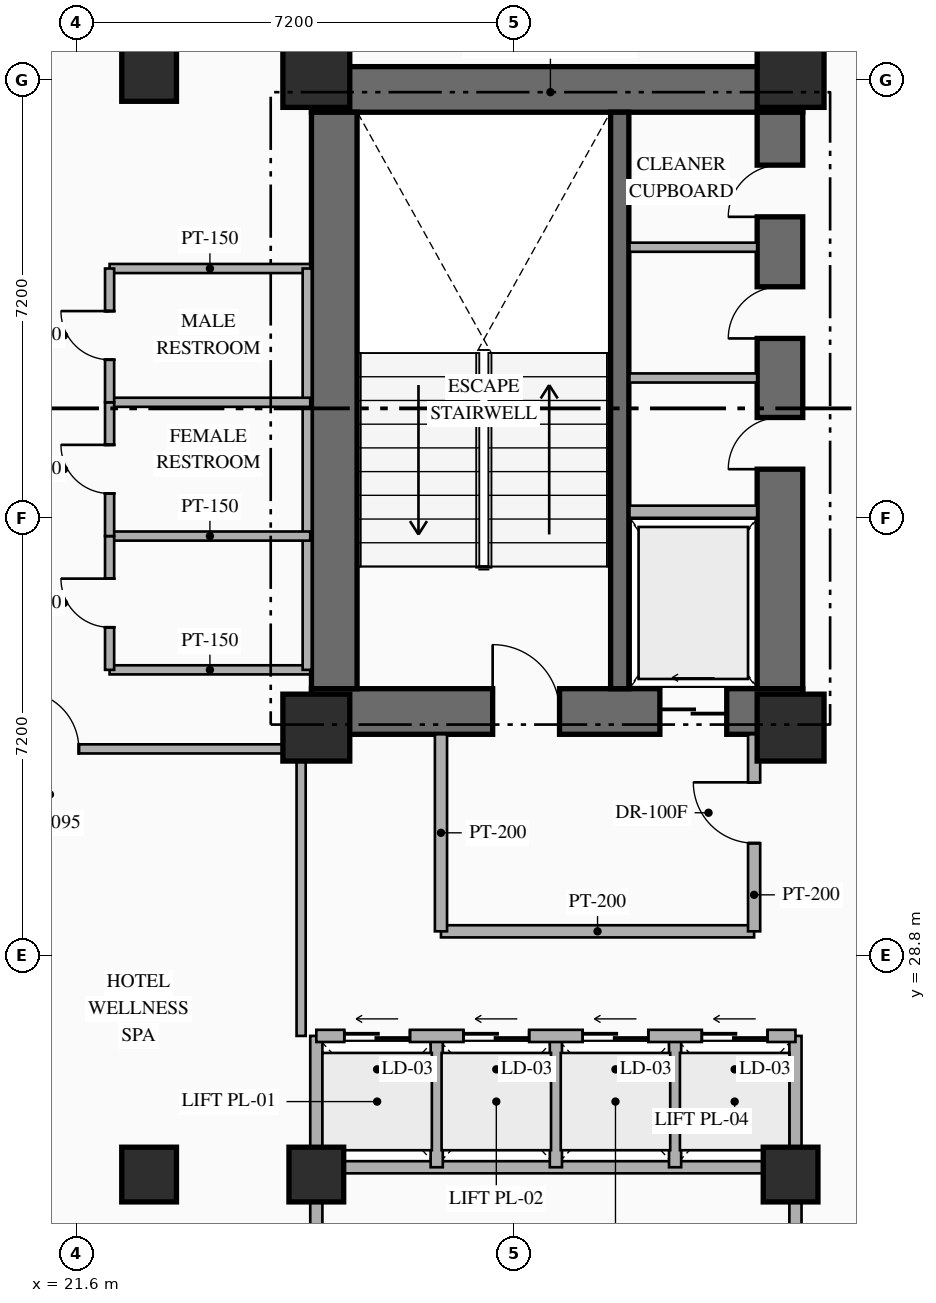
"""IFC4 building model, lengths in metres.
Left out: names, types, materials, properties, quantities, classifications, styles, units other than length and angle.
Written with IfcOpenShell. Run it as: python <this file> out.ifc"""

import sys

from ifc_helpers import new_model, si_unit, direction, frame, frame_2d, origin, origin_2d, place, context, subcontext, project, spatial, rectangle, hollow_rectangle, extrude, element, fill, save


model = new_model("IFC4")
c1 = context("Model", 3, precision=1e-05, world=origin(), true_north=direction((0.0, 1.0)))
c2 = subcontext(c1, "Body", "Model", "MODEL_VIEW")
j1 = project(units=[si_unit("LENGTHUNIT", "METRE"), si_unit("PLANEANGLEUNIT", "RADIAN")], contexts=[c1])
p1 = place(None, origin())
s1 = spatial("IfcSite", under=j1, at=p1, CompositionType="ELEMENT")
p2 = place(p1, origin())
s2 = spatial("IfcBuilding", under=s1, at=p2, CompositionType="ELEMENT")
p3 = place(p2, frame((0.0, 0.0, 81.3)))
s3 = spatial("IfcBuildingStorey", under=s2, at=p3, CompositionType="ELEMENT", Elevation=81.3)
p4 = place(p3, frame((25.47, 32.815, 0.0), z_axis=(0.0, 0.0, 1.0), x_axis=(1.0, 0.0, 0.0)))
e1 = element("IfcWall", 1, at=p4, inside=s3, PredefinedType="SHEAR", context=c2, shape_type="SweptSolid", body=[
    extrude(rectangle(XDim=8.08, YDim=0.75, at=frame_2d((4.04, 0.0))), origin(), (0.0, 0.0, 1.0), 3.35),
])
p5 = place(p4, frame((2.98, 0.0, 0.0)))
e2 = element("IfcOpeningElement", 2, at=p5, cuts=e1, PredefinedType="OPENING", context=c2, shape_type="SweptSolid", body=[
    extrude(rectangle(XDim=1.1, YDim=2.2, at=frame_2d((0.55, 1.1))), frame((0.0, 0.385, 0.0), z_axis=(0.0, -1.0, 0.0), x_axis=(1.0, 0.0, 0.0)), (0.0, 0.0, 1.0), 0.77),
])
p6 = place(p4, frame((5.73, 0.0, 0.0)))
e3 = element("IfcOpeningElement", 3, at=p6, cuts=e1, PredefinedType="OPENING", context=c2, shape_type="SweptSolid", body=[
    extrude(rectangle(XDim=1.1, YDim=2.15, at=frame_2d((0.55, 1.075))), frame((0.0, 0.385, 0.0), z_axis=(0.0, -1.0, 0.0), x_axis=(1.0, 0.0, 0.0)), (0.0, 0.0, 1.0), 0.77),
])
p7 = place(p3, frame((25.47, 43.045, 0.0), z_axis=(0.0, 0.0, 1.0), x_axis=(1.0, 0.0, 0.0)))
e4 = element("IfcWall", 4, at=p7, inside=s3, PredefinedType="SHEAR", context=c2, shape_type="SweptSolid", body=[
    extrude(rectangle(XDim=8.08, YDim=0.75, at=frame_2d((4.04, 0.0))), origin(), (0.0, 0.0, 1.0), 3.35),
])
p8 = place(p3, frame((25.845, 33.19, 0.0), z_axis=(0.0, 0.0, 1.0), x_axis=(0.0, 1.0, 0.0)))
e5 = element("IfcWall", 5, at=p8, inside=s3, PredefinedType="SHEAR", context=c2, shape_type="SweptSolid", body=[
    extrude(rectangle(XDim=9.48, YDim=0.75, at=frame_2d((4.74, 0.0))), origin(), (0.0, 0.0, 1.0), 3.35),
])
p9 = place(p3, frame((33.175, 33.19, 0.0), z_axis=(0.0, 0.0, 1.0), x_axis=(0.0, 1.0, 0.0)))
e6 = element("IfcWall", 6, at=p9, inside=s3, PredefinedType="SHEAR", context=c2, shape_type="SweptSolid", body=[
    extrude(rectangle(XDim=9.48, YDim=0.75, at=frame_2d((4.74, 0.0))), origin(), (0.0, 0.0, 1.0), 3.35),
])
p10 = place(p9, frame((3.61, 0.0, 0.0)))
e7 = element("IfcOpeningElement", 7, at=p10, cuts=e6, PredefinedType="OPENING", context=c2, shape_type="SweptSolid", body=[
    extrude(rectangle(XDim=0.85, YDim=2.08, at=frame_2d((0.425, 1.04))), frame((0.0, 0.385, 0.0), z_axis=(0.0, -1.0, 0.0), x_axis=(1.0, 0.0, 0.0)), (0.0, 0.0, 1.0), 0.77),
])
p11 = place(p9, frame((5.76, 0.0, 0.0)))
e8 = element("IfcOpeningElement", 8, at=p11, cuts=e6, PredefinedType="OPENING", context=c2, shape_type="SweptSolid", body=[
    extrude(rectangle(XDim=0.85, YDim=2.08, at=frame_2d((0.425, 1.04))), frame((0.0, 0.385, 0.0), z_axis=(0.0, -1.0, 0.0), x_axis=(1.0, 0.0, 0.0)), (0.0, 0.0, 1.0), 0.77),
])
p12 = place(p9, frame((7.76, 0.0, 0.0)))
e9 = element("IfcOpeningElement", 9, at=p12, cuts=e6, PredefinedType="OPENING", context=c2, shape_type="SweptSolid", body=[
    extrude(rectangle(XDim=0.85, YDim=2.08, at=frame_2d((0.425, 1.04))), frame((0.0, 0.385, 0.0), z_axis=(0.0, -1.0, 0.0), x_axis=(1.0, 0.0, 0.0)), (0.0, 0.0, 1.0), 0.77),
])
p13 = place(p3, frame((30.54, 33.19, 0.0), z_axis=(0.0, 0.0, 1.0), x_axis=(0.0, 1.0, 0.0)))
e10 = element("IfcWall", 10, at=p13, inside=s3, PredefinedType="SHEAR", context=c2, shape_type="SweptSolid", body=[
    extrude(rectangle(XDim=9.48, YDim=0.3, at=frame_2d((4.74, 0.0))), origin(), (0.0, 0.0, 1.0), 3.35),
])
for number, where, z_axis, x_axis in (
    (11, (25.55, 32.55, 0.0), (0.0, 0.0, 1.0), (1.0, 0.0, 0.0)),
    (12, (33.35, 32.55, 0.0), (0.0, 0.0, 1.0), (1.0, 0.0, 0.0)),
    (13, (25.55, 43.3, 0.0), (0.0, 0.0, 1.0), (1.0, 0.0, 0.0)),
    (14, (33.35, 43.3, 0.0), (0.0, 0.0, 1.0), (1.0, 0.0, 0.0)),
):
    element("IfcColumn", number, at=place(p3, frame(where, z_axis=z_axis, x_axis=x_axis)), inside=s3, PredefinedType="COLUMN", context=c2, shape_type="SweptSolid", body=[
        extrude(rectangle(XDim=1.1, YDim=1.1, at=origin_2d()), origin(), (0.0, 0.0, 1.0), 3.35),
    ])
for number, where, z_axis, x_axis in (
    (15, (25.55, 25.2, 0.0), (0.0, 0.0, 1.0), (1.0, 0.0, 0.0)),
    (16, (33.35, 25.2, 0.0), (0.0, 0.0, 1.0), (1.0, 0.0, 0.0)),
    (17, (22.8, 25.2, 0.0), (0.0, 0.0, 1.0), (1.0, 0.0, 0.0)),
    (18, (22.8, 43.3, 0.0), (0.0, 0.0, 1.0), (1.0, 0.0, 0.0)),
):
    element("IfcColumn", number, at=place(p3, frame(where, z_axis=z_axis, x_axis=x_axis)), inside=s3, PredefinedType="COLUMN", context=c2, shape_type="SweptSolid", body=[
        extrude(hollow_rectangle(XDim=0.9, YDim=0.9, WallThickness=0.036, at=origin_2d()), origin(), (0.0, 0.0, 1.0), 3.35),
    ])
p14 = place(p3, frame((30.7, 36.1, 0.0), z_axis=(0.0, 0.0, 1.0), x_axis=(1.0, 0.0, 0.0)))
e19 = element("IfcWall", 19, at=p14, inside=s3, PredefinedType="STANDARD", context=c2, shape_type="SweptSolid", body=[
    extrude(rectangle(XDim=2.1, YDim=0.2, at=frame_2d((1.05, 0.0))), origin(), (0.0, 0.0, 1.0), 3.13),
])
for number, where, z_axis, x_axis in (
    (20, (30.7, 38.3, 0.0), (0.0, 0.0, 1.0), (1.0, 0.0, 0.0)),
    (21, (30.7, 40.45, 0.0), (0.0, 0.0, 1.0), (1.0, 0.0, 0.0)),
):
    element("IfcWall", number, at=place(p3, frame(where, z_axis=z_axis, x_axis=x_axis)), inside=s3, PredefinedType="PARTITIONING", context=c2, shape_type="SweptSolid", body=[
        extrude(rectangle(XDim=2.1, YDim=0.15, at=frame_2d((1.05, 0.0))), origin(), (0.0, 0.0, 1.0), 3.13),
    ])
p15 = place(p3, frame((27.6, 29.2, 0.0), z_axis=(0.0, 0.0, 1.0), x_axis=(1.0, 0.0, 0.0)))
e22 = element("IfcWall", 22, at=p15, inside=s3, PredefinedType="STANDARD", context=c2, shape_type="SweptSolid", body=[
    extrude(rectangle(XDim=5.15, YDim=0.2, at=frame_2d((2.575, 0.0))), origin(), (0.0, 0.0, 1.0), 3.13),
])
p16 = place(p3, frame((27.6, 29.2, 0.0), z_axis=(0.0, 0.0, 1.0), x_axis=(0.0, 1.0, 0.0)))
e23 = element("IfcWall", 23, at=p16, inside=s3, PredefinedType="STANDARD", context=c2, shape_type="SweptSolid", body=[
    extrude(rectangle(XDim=3.24, YDim=0.2, at=frame_2d((1.62, 0.0))), origin(), (0.0, 0.0, 1.0), 3.13),
])
p17 = place(p3, frame((32.75, 29.2, 0.0), z_axis=(0.0, 0.0, 1.0), x_axis=(0.0, 1.0, 0.0)))
e24 = element("IfcWall", 24, at=p17, inside=s3, PredefinedType="STANDARD", context=c2, shape_type="SweptSolid", body=[
    extrude(rectangle(XDim=3.24, YDim=0.2, at=frame_2d((1.62, 0.0))), origin(), (0.0, 0.0, 1.0), 3.13),
])
p18 = place(p17, frame((1.45, 0.0, 0.0)))
e25 = element("IfcOpeningElement", 25, at=p18, cuts=e24, PredefinedType="OPENING", context=c2, shape_type="SweptSolid", body=[
    extrude(rectangle(XDim=1.0, YDim=2.2, at=frame_2d((0.5, 1.1))), frame((0.0, 0.11, 0.0), z_axis=(0.0, -1.0, 0.0), x_axis=(1.0, 0.0, 0.0)), (0.0, 0.0, 1.0), 0.22),
])
for number, where, z_axis, x_axis in (
    (26, (25.55, 23.4, 0.0), (0.0, 0.0, 1.0), (0.0, 1.0, 0.0)),
    (27, (33.43, 23.4, 0.0), (0.0, 0.0, 1.0), (0.0, 1.0, 0.0)),
):
    element("IfcWall", number, at=place(p3, frame(where, z_axis=z_axis, x_axis=x_axis)), inside=s3, PredefinedType="STANDARD", context=c2, shape_type="SweptSolid", body=[
        extrude(rectangle(XDim=4.08, YDim=0.2, at=frame_2d((2.04, 0.0))), origin(), (0.0, 0.0, 1.0), 2.425),
    ])
p19 = place(p3, frame((25.55, 25.32, 0.0), z_axis=(0.0, 0.0, 1.0), x_axis=(1.0, 0.0, 0.0)))
e28 = element("IfcWall", 28, at=p19, inside=s3, PredefinedType="STANDARD", context=c2, shape_type="SweptSolid", body=[
    extrude(rectangle(XDim=7.88, YDim=0.2, at=frame_2d((3.94, 0.0))), origin(), (0.0, 0.0, 1.0), 2.525),
])
for number, where, z_axis, x_axis in (
    (29, (27.53, 25.32, 0.0), (0.0, 0.0, 1.0), (0.0, 1.0, 0.0)),
    (30, (29.49, 25.32, 0.0), (0.0, 0.0, 1.0), (0.0, 1.0, 0.0)),
    (31, (31.45, 25.32, 0.0), (0.0, 0.0, 1.0), (0.0, 1.0, 0.0)),
):
    element("IfcWall", number, at=place(p3, frame(where, z_axis=z_axis, x_axis=x_axis)), inside=s3, PredefinedType="STANDARD", context=c2, shape_type="SweptSolid", body=[
        extrude(rectangle(XDim=2.16, YDim=0.2, at=frame_2d((1.08, 0.0))), origin(), (0.0, 0.0, 1.0), 3.13),
    ])
p20 = place(p3, frame((25.55, 27.48, 0.0), z_axis=(0.0, 0.0, 1.0), x_axis=(1.0, 0.0, 0.0)))
e32 = element("IfcWall", 32, at=p20, inside=s3, PredefinedType="STANDARD", context=c2, shape_type="SweptSolid", body=[
    extrude(rectangle(XDim=7.88, YDim=0.2, at=frame_2d((3.94, 0.0))), origin(), (0.0, 0.0, 1.0), 3.13),
])
p21 = place(p20, frame((0.46, 0.0, 0.0)))
e33 = element("IfcOpeningElement", 33, at=p21, cuts=e32, PredefinedType="OPENING", context=c2, shape_type="SweptSolid", body=[
    extrude(rectangle(XDim=1.08, YDim=2.15, at=frame_2d((0.54, 1.075))), frame((0.0, 0.11, 0.0), z_axis=(0.0, -1.0, 0.0), x_axis=(1.0, 0.0, 0.0)), (0.0, 0.0, 1.0), 0.22),
])
p22 = place(p20, frame((2.42, 0.0, 0.0)))
e34 = element("IfcOpeningElement", 34, at=p22, cuts=e32, PredefinedType="OPENING", context=c2, shape_type="SweptSolid", body=[
    extrude(rectangle(XDim=1.08, YDim=2.15, at=frame_2d((0.54, 1.075))), frame((0.0, 0.11, 0.0), z_axis=(0.0, -1.0, 0.0), x_axis=(1.0, 0.0, 0.0)), (0.0, 0.0, 1.0), 0.22),
])
p23 = place(p20, frame((4.38, 0.0, 0.0)))
e35 = element("IfcOpeningElement", 35, at=p23, cuts=e32, PredefinedType="OPENING", context=c2, shape_type="SweptSolid", body=[
    extrude(rectangle(XDim=1.08, YDim=2.15, at=frame_2d((0.54, 1.075))), frame((0.0, 0.11, 0.0), z_axis=(0.0, -1.0, 0.0), x_axis=(1.0, 0.0, 0.0)), (0.0, 0.0, 1.0), 0.22),
])
p24 = place(p20, frame((6.34, 0.0, 0.0)))
e36 = element("IfcOpeningElement", 36, at=p24, cuts=e32, PredefinedType="OPENING", context=c2, shape_type="SweptSolid", body=[
    extrude(rectangle(XDim=1.08, YDim=2.15, at=frame_2d((0.54, 1.075))), frame((0.0, 0.11, 0.0), z_axis=(0.0, -1.0, 0.0), x_axis=(1.0, 0.0, 0.0)), (0.0, 0.0, 1.0), 0.22),
])
for number, where, z_axis, x_axis in (
    (37, (22.15, 33.5, 0.0), (0.0, 0.0, 1.0), (1.0, 0.0, 0.0)),
    (38, (22.15, 40.1, 0.0), (0.0, 0.0, 1.0), (1.0, 0.0, 0.0)),
):
    element("IfcWall", number, at=place(p3, frame(where, z_axis=z_axis, x_axis=x_axis)), inside=s3, PredefinedType="PARTITIONING", context=c2, shape_type="SweptSolid", body=[
        extrude(rectangle(XDim=3.3, YDim=0.15, at=frame_2d((1.65, 0.0))), origin(), (0.0, 0.0, 1.0), 3.13),
    ])
p25 = place(p3, frame((25.4, 33.5, 0.0), z_axis=(0.0, 0.0, 1.0), x_axis=(0.0, 1.0, 0.0)))
e39 = element("IfcWall", 39, at=p25, inside=s3, PredefinedType="PARTITIONING", context=c2, shape_type="SweptSolid", body=[
    extrude(rectangle(XDim=6.6, YDim=0.15, at=frame_2d((3.3, 0.0))), origin(), (0.0, 0.0, 1.0), 3.13),
])
for number, where, z_axis, x_axis in (
    (40, (22.15, 35.7, 0.0), (0.0, 0.0, 1.0), (1.0, 0.0, 0.0)),
    (41, (22.15, 37.9, 0.0), (0.0, 0.0, 1.0), (1.0, 0.0, 0.0)),
):
    element("IfcWall", number, at=place(p3, frame(where, z_axis=z_axis, x_axis=x_axis)), inside=s3, PredefinedType="PARTITIONING", context=c2, shape_type="SweptSolid", body=[
        extrude(rectangle(XDim=3.3, YDim=0.15, at=frame_2d((1.65, 0.0))), origin(), (0.0, 0.0, 1.0), 3.13),
    ])
p26 = place(p3, frame((22.15, 33.5, 0.0), z_axis=(0.0, 0.0, 1.0), x_axis=(0.0, 1.0, 0.0)))
e42 = element("IfcWall", 42, at=p26, inside=s3, PredefinedType="PARTITIONING", context=c2, shape_type="SweptSolid", body=[
    extrude(rectangle(XDim=2.2, YDim=0.15, at=frame_2d((1.1, 0.0))), origin(), (0.0, 0.0, 1.0), 3.13),
])
p27 = place(p26, frame((0.7, 0.0, 0.0)))
e43 = element("IfcOpeningElement", 43, at=p27, cuts=e42, PredefinedType="OPENING", context=c2, shape_type="SweptSolid", body=[
    extrude(rectangle(XDim=0.8, YDim=2.06, at=frame_2d((0.4, 1.03))), frame((0.0, 0.085, 0.0), z_axis=(0.0, -1.0, 0.0), x_axis=(1.0, 0.0, 0.0)), (0.0, 0.0, 1.0), 0.17),
])
p28 = place(p3, frame((22.15, 35.7, 0.0), z_axis=(0.0, 0.0, 1.0), x_axis=(0.0, 1.0, 0.0)))
e44 = element("IfcWall", 44, at=p28, inside=s3, PredefinedType="PARTITIONING", context=c2, shape_type="SweptSolid", body=[
    extrude(rectangle(XDim=2.2, YDim=0.15, at=frame_2d((1.1, 0.0))), origin(), (0.0, 0.0, 1.0), 3.13),
])
p29 = place(p28, frame((0.7, 0.0, 0.0)))
e45 = element("IfcOpeningElement", 45, at=p29, cuts=e44, PredefinedType="OPENING", context=c2, shape_type="SweptSolid", body=[
    extrude(rectangle(XDim=0.8, YDim=2.06, at=frame_2d((0.4, 1.03))), frame((0.0, 0.085, 0.0), z_axis=(0.0, -1.0, 0.0), x_axis=(1.0, 0.0, 0.0)), (0.0, 0.0, 1.0), 0.17),
])
p30 = place(p3, frame((22.15, 37.9, 0.0), z_axis=(0.0, 0.0, 1.0), x_axis=(0.0, 1.0, 0.0)))
e46 = element("IfcWall", 46, at=p30, inside=s3, PredefinedType="PARTITIONING", context=c2, shape_type="SweptSolid", body=[
    extrude(rectangle(XDim=2.2, YDim=0.15, at=frame_2d((1.1, 0.0))), origin(), (0.0, 0.0, 1.0), 3.13),
])
p31 = place(p30, frame((0.7, 0.0, 0.0)))
e47 = element("IfcOpeningElement", 47, at=p31, cuts=e46, PredefinedType="OPENING", context=c2, shape_type="SweptSolid", body=[
    extrude(rectangle(XDim=0.8, YDim=2.06, at=frame_2d((0.4, 1.03))), frame((0.0, 0.085, 0.0), z_axis=(0.0, -1.0, 0.0), x_axis=(1.0, 0.0, 0.0)), (0.0, 0.0, 1.0), 0.17),
])
p32 = place(p3, frame((33.384, 17.312, 0.0), z_axis=(0.0, 0.0, 1.0), x_axis=(0.600008743659, 0.799993442181, 0.0)))
e48 = element("IfcWall", 48, at=p32, inside=s3, PredefinedType="PARTITIONING", context=c2, shape_type="SweptSolid", body=[
    extrude(rectangle(XDim=8.935, YDim=0.15, at=frame_2d((4.468, 0.0))), origin(), (0.0, 0.0, 1.0), 3.13),
])
p33 = place(p3, frame((19.95, 32.2, 0.0), z_axis=(0.0, 0.0, 1.0), x_axis=(1.0, 0.0, 0.0)))
e49 = element("IfcWall", 49, at=p33, inside=s3, PredefinedType="PARTITIONING", context=c2, shape_type="SweptSolid", body=[
    extrude(rectangle(XDim=5.35, YDim=0.15, at=frame_2d((2.675, 0.0))), origin(), (0.0, 0.0, 1.0), 3.13),
])
p34 = place(p33, frame((0.744, 0.0, 0.0)))
e50 = element("IfcOpeningElement", 50, at=p34, cuts=e49, PredefinedType="OPENING", context=c2, shape_type="SweptSolid", body=[
    extrude(rectangle(XDim=0.95, YDim=2.15, at=frame_2d((0.475, 1.075))), frame((0.0, 0.085, 0.0), z_axis=(0.0, -1.0, 0.0), x_axis=(1.0, 0.0, 0.0)), (0.0, 0.0, 1.0), 0.17),
])
p35 = place(p3, frame((25.3, 27.48, 0.0), z_axis=(0.0, 0.0, 1.0), x_axis=(0.0, 1.0, 0.0)))
e51 = element("IfcWall", 51, at=p35, inside=s3, PredefinedType="PARTITIONING", context=c2, shape_type="SweptSolid", body=[
    extrude(rectangle(XDim=4.72, YDim=0.15, at=frame_2d((2.36, 0.0))), origin(), (0.0, 0.0, 1.0), 2.425),
])
p36 = place(p5, origin())
e52 = element("IfcDoor", 52, at=p36, inside=s3, OperationType="SINGLE_SWING_LEFT", PredefinedType="DOOR", context=c2, shape_type="SweptSolid", body=[
    extrude(rectangle(XDim=1.1, YDim=2.2, at=frame_2d((0.55, 1.1))), frame((0.0, 0.025, 0.0), z_axis=(0.0, -1.0, 0.0), x_axis=(1.0, 0.0, 0.0)), (0.0, 0.0, 1.0), 0.05),
])
fill(e2, e52)
p37 = place(p6, origin())
e53 = element("IfcDoor", 53, at=p37, inside=s3, OperationType="SLIDING_TO_LEFT", PredefinedType="USERDEFINED", context=c2, shape_type="SweptSolid", body=[
    extrude(rectangle(XDim=1.1, YDim=2.15, at=frame_2d((0.55, 1.075))), frame((0.0, 0.025, 0.0), z_axis=(0.0, -1.0, 0.0), x_axis=(1.0, 0.0, 0.0)), (0.0, 0.0, 1.0), 0.05),
])
fill(e3, e53)
p38 = place(p10, origin())
e54 = element("IfcDoor", 54, at=p38, inside=s3, OperationType="SINGLE_SWING_LEFT", PredefinedType="DOOR", context=c2, shape_type="SweptSolid", body=[
    extrude(rectangle(XDim=0.85, YDim=2.08, at=frame_2d((0.425, 1.04))), frame((0.0, 0.025, 0.0), z_axis=(0.0, -1.0, 0.0), x_axis=(1.0, 0.0, 0.0)), (0.0, 0.0, 1.0), 0.05),
])
fill(e7, e54)
p39 = place(p11, origin())
e55 = element("IfcDoor", 55, at=p39, inside=s3, OperationType="SINGLE_SWING_LEFT", PredefinedType="DOOR", context=c2, shape_type="SweptSolid", body=[
    extrude(rectangle(XDim=0.85, YDim=2.08, at=frame_2d((0.425, 1.04))), frame((0.0, 0.025, 0.0), z_axis=(0.0, -1.0, 0.0), x_axis=(1.0, 0.0, 0.0)), (0.0, 0.0, 1.0), 0.05),
])
fill(e8, e55)
p40 = place(p12, origin())
e56 = element("IfcDoor", 56, at=p40, inside=s3, OperationType="SINGLE_SWING_LEFT", PredefinedType="DOOR", context=c2, shape_type="SweptSolid", body=[
    extrude(rectangle(XDim=0.85, YDim=2.08, at=frame_2d((0.425, 1.04))), frame((0.0, 0.025, 0.0), z_axis=(0.0, -1.0, 0.0), x_axis=(1.0, 0.0, 0.0)), (0.0, 0.0, 1.0), 0.05),
])
fill(e9, e56)
p41 = place(p18, origin())
e57 = element("IfcDoor", 57, at=p41, inside=s3, OperationType="SINGLE_SWING_RIGHT", PredefinedType="DOOR", context=c2, shape_type="SweptSolid", body=[
    extrude(rectangle(XDim=1.0, YDim=2.2, at=frame_2d((0.5, 1.1))), frame((0.0, 0.025, 0.0), z_axis=(0.0, -1.0, 0.0), x_axis=(1.0, 0.0, 0.0)), (0.0, 0.0, 1.0), 0.05),
])
fill(e25, e57)
p42 = place(p21, origin())
e58 = element("IfcDoor", 58, at=p42, inside=s3, OperationType="SLIDING_TO_LEFT", PredefinedType="USERDEFINED", context=c2, shape_type="SweptSolid", body=[
    extrude(rectangle(XDim=1.08, YDim=2.15, at=frame_2d((0.54, 1.075))), frame((0.0, 0.025, 0.0), z_axis=(0.0, -1.0, 0.0), x_axis=(1.0, 0.0, 0.0)), (0.0, 0.0, 1.0), 0.05),
])
fill(e33, e58)
p43 = place(p22, origin())
e59 = element("IfcDoor", 59, at=p43, inside=s3, OperationType="SLIDING_TO_LEFT", PredefinedType="USERDEFINED", context=c2, shape_type="SweptSolid", body=[
    extrude(rectangle(XDim=1.08, YDim=2.15, at=frame_2d((0.54, 1.075))), frame((0.0, 0.025, 0.0), z_axis=(0.0, -1.0, 0.0), x_axis=(1.0, 0.0, 0.0)), (0.0, 0.0, 1.0), 0.05),
])
fill(e34, e59)
p44 = place(p23, origin())
e60 = element("IfcDoor", 60, at=p44, inside=s3, OperationType="SLIDING_TO_LEFT", PredefinedType="USERDEFINED", context=c2, shape_type="SweptSolid", body=[
    extrude(rectangle(XDim=1.08, YDim=2.15, at=frame_2d((0.54, 1.075))), frame((0.0, 0.025, 0.0), z_axis=(0.0, -1.0, 0.0), x_axis=(1.0, 0.0, 0.0)), (0.0, 0.0, 1.0), 0.05),
])
fill(e35, e60)
p45 = place(p24, origin())
e61 = element("IfcDoor", 61, at=p45, inside=s3, OperationType="SLIDING_TO_LEFT", PredefinedType="USERDEFINED", context=c2, shape_type="SweptSolid", body=[
    extrude(rectangle(XDim=1.08, YDim=2.15, at=frame_2d((0.54, 1.075))), frame((0.0, 0.025, 0.0), z_axis=(0.0, -1.0, 0.0), x_axis=(1.0, 0.0, 0.0)), (0.0, 0.0, 1.0), 0.05),
])
fill(e36, e61)
p46 = place(p27, origin())
e62 = element("IfcDoor", 62, at=p46, inside=s3, OperationType="SINGLE_SWING_RIGHT", PredefinedType="DOOR", context=c2, shape_type="SweptSolid", body=[
    extrude(rectangle(XDim=0.8, YDim=2.06, at=frame_2d((0.4, 1.03))), frame((0.0, 0.025, 0.0), z_axis=(0.0, -1.0, 0.0), x_axis=(1.0, 0.0, 0.0)), (0.0, 0.0, 1.0), 0.05),
])
fill(e43, e62)
p47 = place(p29, origin())
e63 = element("IfcDoor", 63, at=p47, inside=s3, OperationType="SINGLE_SWING_RIGHT", PredefinedType="DOOR", context=c2, shape_type="SweptSolid", body=[
    extrude(rectangle(XDim=0.8, YDim=2.06, at=frame_2d((0.4, 1.03))), frame((0.0, 0.025, 0.0), z_axis=(0.0, -1.0, 0.0), x_axis=(1.0, 0.0, 0.0)), (0.0, 0.0, 1.0), 0.05),
])
fill(e45, e63)
p48 = place(p31, origin())
e64 = element("IfcDoor", 64, at=p48, inside=s3, OperationType="SINGLE_SWING_RIGHT", PredefinedType="DOOR", context=c2, shape_type="SweptSolid", body=[
    extrude(rectangle(XDim=0.8, YDim=2.06, at=frame_2d((0.4, 1.03))), frame((0.0, 0.025, 0.0), z_axis=(0.0, -1.0, 0.0), x_axis=(1.0, 0.0, 0.0)), (0.0, 0.0, 1.0), 0.05),
])
fill(e47, e64)
p49 = place(p34, origin())
e65 = element("IfcDoor", 65, at=p49, inside=s3, OperationType="SINGLE_SWING_LEFT", PredefinedType="DOOR", context=c2, shape_type="SweptSolid", body=[
    extrude(rectangle(XDim=0.95, YDim=2.15, at=frame_2d((0.475, 1.075))), frame((0.0, 0.025, 0.0), z_axis=(0.0, -1.0, 0.0), x_axis=(1.0, 0.0, 0.0)), (0.0, 0.0, 1.0), 0.05),
])
fill(e50, e65)
save(model, sys.argv[1])
